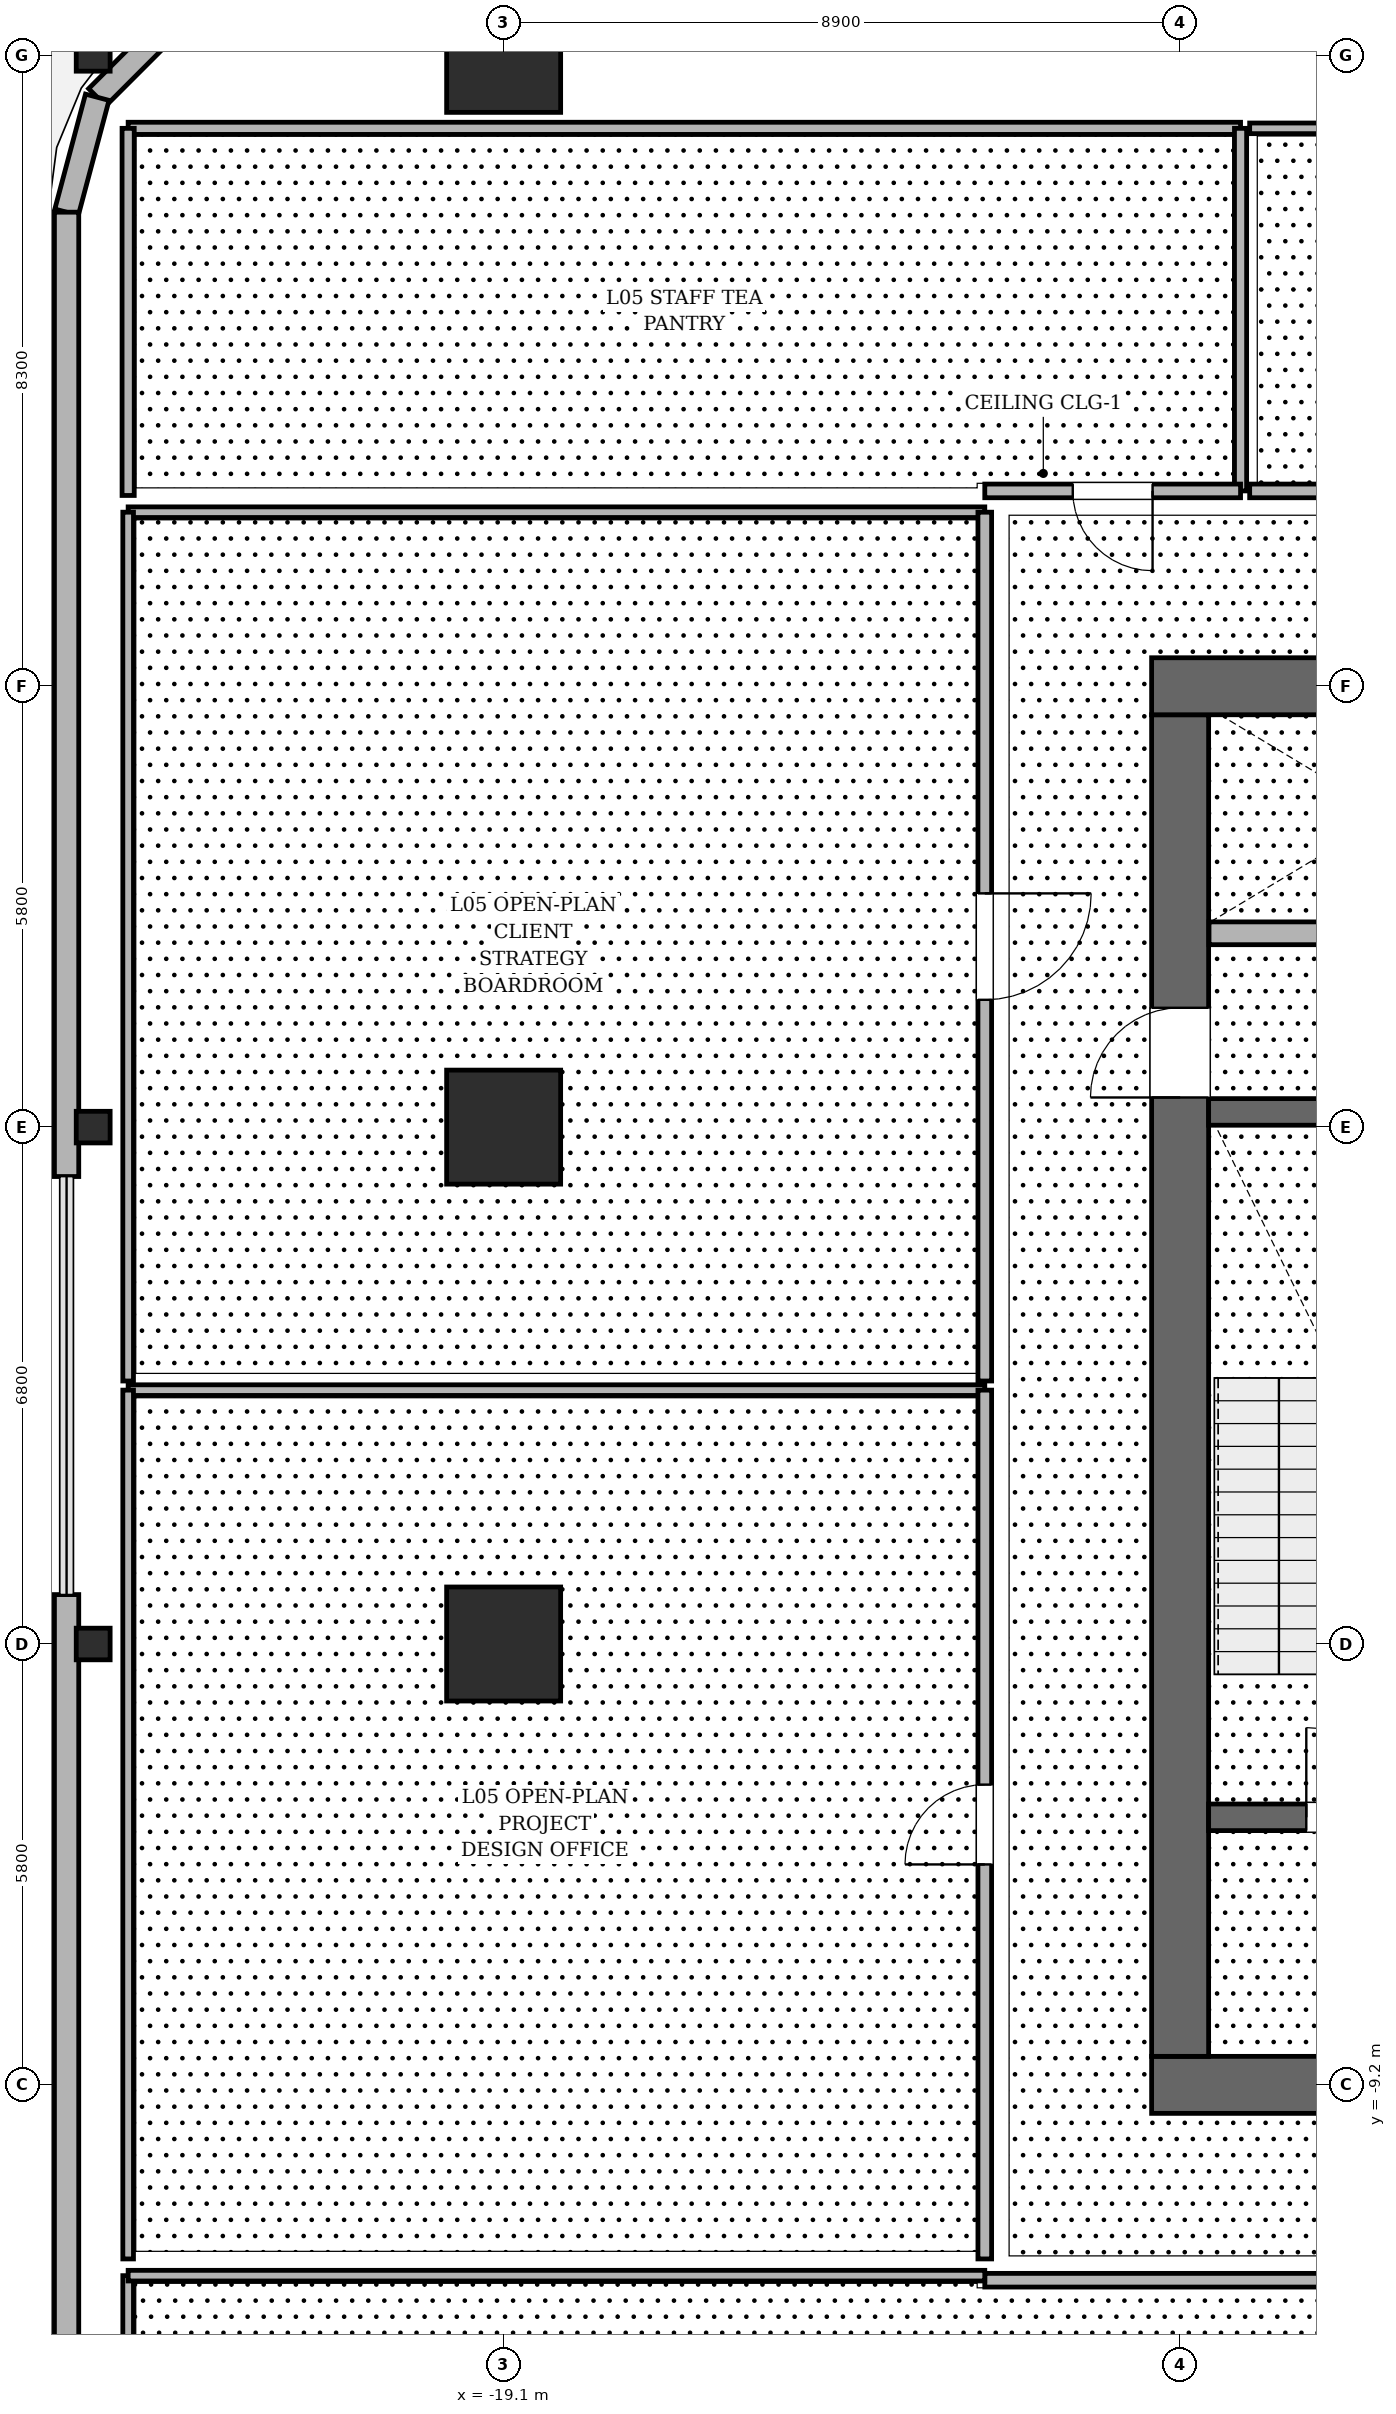
"""IFC4 building model, lengths in metres.
Left out: names, types, materials, properties, quantities, classifications, styles, units other than length and angle.
Written with IfcOpenShell. Run it as: python <this file> out.ifc"""

import sys

from ifc_helpers import new_model, si_unit, direction, frame, frame_2d, origin, origin_2d, place, context, subcontext, project, spatial, rectangle, hollow_rectangle, i_section, extrude, element, fill, save


model = new_model("IFC4")
c1 = context("Model", 3, precision=1e-05, world=origin(), true_north=direction((0.0, 1.0)))
c2 = subcontext(c1, "Body", "Model", "MODEL_VIEW")
j1 = project(units=[si_unit("LENGTHUNIT", "METRE"), si_unit("PLANEANGLEUNIT", "RADIAN")], contexts=[c1])
p1 = place(None, origin())
s1 = spatial("IfcSite", under=j1, at=p1, CompositionType="ELEMENT")
p2 = place(p1, origin())
s2 = spatial("IfcBuilding", under=s1, at=p2, CompositionType="ELEMENT")
p3 = place(p2, frame((0.0, 0.0, 28.2)))
s3 = spatial("IfcBuildingStorey", under=s2, at=p3, CompositionType="ELEMENT", Elevation=28.2)
p4 = place(p3, frame((10.575, -9.2, 0.0), z_axis=(0.0, 0.0, 1.0), x_axis=(-1.0, 0.0, 0.0)))
e1 = element("IfcWall", 1, at=p4, inside=s3, PredefinedType="SHEAR", context=c2, shape_type="SweptSolid", body=[
    extrude(rectangle(XDim=21.15, YDim=0.75, at=frame_2d((10.575, 0.0))), origin(), (0.0, 0.0, 1.0), 4.05),
])
p5 = place(p4, frame((2.85, 0.0, 0.0)))
e2 = element("IfcOpeningElement", 2, at=p5, cuts=e1, PredefinedType="OPENING", context=c2, shape_type="SweptSolid", body=[
    extrude(rectangle(XDim=1.25, YDim=2.25, at=frame_2d((0.625, 1.125))), frame((0.0, 0.385, 0.0), z_axis=(0.0, -1.0, 0.0), x_axis=(1.0, 0.0, 0.0)), (0.0, 0.0, 1.0), 0.77),
])
p6 = place(p4, frame((17.05, 0.0, 0.0)))
e3 = element("IfcOpeningElement", 3, at=p6, cuts=e1, PredefinedType="OPENING", context=c2, shape_type="SweptSolid", body=[
    extrude(rectangle(XDim=1.25, YDim=2.25, at=frame_2d((0.625, 1.125))), frame((0.0, 0.385, 0.0), z_axis=(0.0, -1.0, 0.0), x_axis=(1.0, 0.0, 0.0)), (0.0, 0.0, 1.0), 0.77),
])
p7 = place(p3, frame((-10.2, -8.825, 0.0), z_axis=(0.0, 0.0, 1.0), x_axis=(0.0, 1.0, 0.0)))
e4 = element("IfcWall", 4, at=p7, inside=s3, PredefinedType="SHEAR", context=c2, shape_type="SweptSolid", body=[
    extrude(rectangle(XDim=17.65, YDim=0.75, at=frame_2d((8.825, 0.0))), origin(), (0.0, 0.0, 1.0), 4.05),
])
p8 = place(p7, frame((12.615, 0.0, 0.0)))
e5 = element("IfcOpeningElement", 5, at=p8, cuts=e4, PredefinedType="OPENING", context=c2, shape_type="SweptSolid", body=[
    extrude(rectangle(XDim=1.18, YDim=2.2, at=frame_2d((0.59, 1.1))), frame((0.0, 0.385, 0.0), z_axis=(0.0, -1.0, 0.0), x_axis=(1.0, 0.0, 0.0)), (0.0, 0.0, 1.0), 0.77),
])
p9 = place(p3, frame((-10.575, 9.2, 0.0), z_axis=(0.0, 0.0, 1.0), x_axis=(1.0, 0.0, 0.0)))
e6 = element("IfcWall", 6, at=p9, inside=s3, PredefinedType="SHEAR", context=c2, shape_type="SweptSolid", body=[
    extrude(rectangle(XDim=21.15, YDim=0.75, at=frame_2d((10.575, 0.0))), origin(), (0.0, 0.0, 1.0), 4.05),
])
p10 = place(p3, frame((-9.825, -5.68, 0.0), z_axis=(0.0, 0.0, 1.0), x_axis=(1.0, 0.0, 0.0)))
e7 = element("IfcWall", 7, at=p10, inside=s3, PredefinedType="SOLIDWALL", context=c2, shape_type="SweptSolid", body=[
    extrude(rectangle(XDim=5.175, YDim=0.35, at=frame_2d((2.587, 0.0))), origin(), (0.0, 0.0, 1.0), 4.05),
])
p11 = place(p10, frame((1.285, 0.0, 0.0)))
e8 = element("IfcOpeningElement", 8, at=p11, cuts=e7, PredefinedType="OPENING", context=c2, shape_type="SweptSolid", body=[
    extrude(rectangle(XDim=1.18, YDim=2.2, at=frame_2d((0.59, 1.1))), frame((0.0, 0.185, 0.0), z_axis=(0.0, -1.0, 0.0), x_axis=(1.0, 0.0, 0.0)), (0.0, 0.0, 1.0), 0.37),
])
p12 = place(p3, frame((-9.825, 3.6, 0.0), z_axis=(0.0, 0.0, 1.0), x_axis=(1.0, 0.0, 0.0)))
e9 = element("IfcWall", 9, at=p12, inside=s3, PredefinedType="SOLIDWALL", context=c2, shape_type="SweptSolid", body=[
    extrude(rectangle(XDim=5.175, YDim=0.35, at=frame_2d((2.587, 0.0))), origin(), (0.0, 0.0, 1.0), 4.05),
])
for number, where, z_axis, x_axis in (
    (10, (-19.1, 17.5, 0.0), (0.0, 0.0, 1.0), (1.0, 0.0, 0.0)),
    (11, (-19.1, 3.4, 0.0), (0.0, 0.0, 1.0), (1.0, 0.0, 0.0)),
    (12, (-19.1, -3.4, 0.0), (0.0, 0.0, 1.0), (1.0, 0.0, 0.0)),
):
    element("IfcColumn", number, at=place(p3, frame(where, z_axis=z_axis, x_axis=x_axis)), inside=s3, PredefinedType="COLUMN", context=c2, shape_type="SweptSolid", body=[
        extrude(hollow_rectangle(XDim=1.5, YDim=1.5, WallThickness=0.045, at=origin_2d()), origin(), (0.0, 0.0, 1.0), 4.05),
    ])
for number, where, z_axis, x_axis in (
    (13, (-24.5, -3.4, 0.0), (0.0, 0.0, 1.0), (0.0, 1.0, 0.0)),
    (14, (-24.5, 3.4, 0.0), (0.0, 0.0, 1.0), (0.0, 1.0, 0.0)),
    (15, (-24.5, 17.5, 0.0), (0.0, 0.0, 1.0), (0.0, 1.0, 0.0)),
):
    element("IfcColumn", number, at=place(p3, frame(where, z_axis=z_axis, x_axis=x_axis)), inside=s3, PredefinedType="COLUMN", context=c2, shape_type="SweptSolid", body=[
        extrude(i_section(OverallWidth=0.416, OverallDepth=0.446, WebThickness=0.039, FlangeThickness=0.062, FilletRadius=0.018, at=origin_2d()), origin(), (0.0, 0.0, 1.0), 4.048),
    ])
p13 = place(p3, frame((-23.349, 18.047, 0.0), z_axis=(0.0, 0.0, 1.0), x_axis=(-0.707106781187, -0.707106781187, 0.0)))
e16 = element("IfcWall", 16, at=p13, inside=s3, PredefinedType="SOLIDWALL", context=c2, shape_type="SweptSolid", body=[
    extrude(rectangle(XDim=1.552, YDim=0.32, at=frame_2d((0.776, 0.0))), origin(), (0.0, 0.0, 1.0), 2.484),
])
p14 = place(p3, frame((-24.447, 16.949, 0.0), z_axis=(0.0, 0.0, 1.0), x_axis=(-0.257847112249, -0.966185730957, 0.0)))
e17 = element("IfcWall", 17, at=p14, inside=s3, PredefinedType="SOLIDWALL", context=c2, shape_type="SweptSolid", body=[
    extrude(rectangle(XDim=1.565, YDim=0.32, at=frame_2d((0.783, 0.0))), origin(), (0.0, 0.0, 1.0), 2.524),
])
p15 = place(p3, frame((-24.85, 15.437, 0.0), z_axis=(0.0, 0.0, 1.0), x_axis=(0.0, -1.0, 0.0)))
e18 = element("IfcWall", 18, at=p15, inside=s3, PredefinedType="SOLIDWALL", context=c2, shape_type="SweptSolid", body=[
    extrude(rectangle(XDim=12.687, YDim=0.32, at=frame_2d((6.344, 0.0))), origin(), (0.0, 0.0, 1.0), 2.524),
])
p16 = place(p3, frame((-24.85, -2.75, 0.0), z_axis=(0.0, 0.0, 1.0), x_axis=(0.0, -1.0, 0.0)))
e19 = element("IfcWall", 19, at=p16, inside=s3, PredefinedType="SOLIDWALL", context=c2, shape_type="SweptSolid", body=[
    extrude(rectangle(XDim=17.487, YDim=0.32, at=frame_2d((8.743, 0.0))), origin(), (0.0, 0.0, 1.0), 2.524),
])
p17 = place(p3, frame((-9.82, 5.95, 0.0), z_axis=(0.0, 0.0, 1.0), x_axis=(1.0, 0.0, 0.0)))
e20 = element("IfcWall", 20, at=p17, inside=s3, PredefinedType="SOLIDWALL", context=c2, shape_type="SweptSolid", body=[
    extrude(rectangle(XDim=4.76, YDim=0.3, at=frame_2d((2.38, 0.0))), origin(), (0.0, 0.0, 1.0), 3.81),
])
p18 = place(p3, frame((-12.77, -11.77, 0.0), z_axis=(0.0, 0.0, 1.0), x_axis=(1.0, 0.0, 0.0)))
e21 = element("IfcWall", 21, at=p18, inside=s3, PredefinedType="PARTITIONING", context=c2, shape_type="SweptSolid", body=[
    extrude(rectangle(XDim=25.54, YDim=0.18, at=frame_2d((12.77, 0.0))), origin(), (0.0, 0.0, 1.0), 3.104),
])
p19 = place(p18, frame((12.245, 0.0, 0.0)))
e22 = element("IfcOpeningElement", 22, at=p19, cuts=e21, PredefinedType="OPENING", context=c2, shape_type="SweptSolid", body=[
    extrude(rectangle(XDim=1.05, YDim=2.2, at=frame_2d((0.525, 1.1))), frame((0.0, 0.1, 0.0), z_axis=(0.0, -1.0, 0.0), x_axis=(1.0, 0.0, 0.0)), (0.0, 0.0, 1.0), 0.2),
])
p20 = place(p3, frame((-24.04, -22.147, 0.0), z_axis=(0.0, 0.0, 1.0), x_axis=(0.0, 1.0, 0.0)))
e23 = element("IfcWall", 23, at=p20, inside=s3, PredefinedType="PARTITIONING", context=c2, shape_type="SweptSolid", body=[
    extrude(rectangle(XDim=10.438, YDim=0.14, at=frame_2d((5.219, 0.0))), origin(), (0.0, 0.0, 1.0), 2.484),
])
for number, where, z_axis, x_axis in (
    (24, (-24.04, -11.71, 0.0), (0.0, 0.0, 1.0), (1.0, 0.0, 0.0)),
    (25, (-24.04, -0.06, 0.0), (0.0, 0.0, 1.0), (1.0, 0.0, 0.0)),
):
    element("IfcWall", number, at=place(p3, frame(where, z_axis=z_axis, x_axis=x_axis)), inside=s3, PredefinedType="PARTITIONING", context=c2, shape_type="SweptSolid", body=[
        extrude(rectangle(XDim=11.27, YDim=0.14, at=frame_2d((5.635, 0.0))), origin(), (0.0, 0.0, 1.0), 3.104),
    ])
p21 = place(p3, frame((-12.77, -0.06, 0.0), z_axis=(0.0, 0.0, 1.0), x_axis=(0.0, -1.0, 0.0)))
e26 = element("IfcWall", 26, at=p21, inside=s3, PredefinedType="PARTITIONING", context=c2, shape_type="SweptSolid", body=[
    extrude(rectangle(XDim=11.43, YDim=0.18, at=frame_2d((5.715, 0.0))), origin(), (0.0, 0.0, 1.0), 3.104),
])
p22 = place(p21, frame((5.19, 0.0, 0.0)))
e27 = element("IfcOpeningElement", 27, at=p22, cuts=e26, PredefinedType="OPENING", context=c2, shape_type="SweptSolid", body=[
    extrude(rectangle(XDim=1.05, YDim=2.2, at=frame_2d((0.525, 1.1))), frame((0.0, 0.1, 0.0), z_axis=(0.0, -1.0, 0.0), x_axis=(1.0, 0.0, 0.0)), (0.0, 0.0, 1.0), 0.2),
])
p23 = place(p3, frame((-24.04, -11.49, 0.0), z_axis=(0.0, 0.0, 1.0), x_axis=(0.0, 1.0, 0.0)))
e28 = element("IfcWall", 28, at=p23, inside=s3, PredefinedType="PARTITIONING", context=c2, shape_type="SweptSolid", body=[
    extrude(rectangle(XDim=11.43, YDim=0.14, at=frame_2d((5.715, 0.0))), origin(), (0.0, 0.0, 1.0), 2.484),
])
p24 = place(p3, frame((-24.04, 11.49, 0.0), z_axis=(0.0, 0.0, 1.0), x_axis=(1.0, 0.0, 0.0)))
e29 = element("IfcWall", 29, at=p24, inside=s3, PredefinedType="PARTITIONING", context=c2, shape_type="SweptSolid", body=[
    extrude(rectangle(XDim=11.27, YDim=0.14, at=frame_2d((5.635, 0.0))), origin(), (0.0, 0.0, 1.0), 3.104),
])
p25 = place(p3, frame((-12.77, 11.49, 0.0), z_axis=(0.0, 0.0, 1.0), x_axis=(0.0, -1.0, 0.0)))
e30 = element("IfcWall", 30, at=p25, inside=s3, PredefinedType="PARTITIONING", context=c2, shape_type="SweptSolid", body=[
    extrude(rectangle(XDim=11.43, YDim=0.18, at=frame_2d((5.715, 0.0))), origin(), (0.0, 0.0, 1.0), 3.104),
])
p26 = place(p25, frame((5.015, 0.0, 0.0)))
e31 = element("IfcOpeningElement", 31, at=p26, cuts=e30, PredefinedType="OPENING", context=c2, shape_type="SweptSolid", body=[
    extrude(rectangle(XDim=1.4, YDim=2.25, at=frame_2d((0.7, 1.125))), frame((0.0, 0.1, 0.0), z_axis=(0.0, -1.0, 0.0), x_axis=(1.0, 0.0, 0.0)), (0.0, 0.0, 1.0), 0.2),
])
p27 = place(p3, frame((-24.04, 0.06, 0.0), z_axis=(0.0, 0.0, 1.0), x_axis=(0.0, 1.0, 0.0)))
e32 = element("IfcWall", 32, at=p27, inside=s3, PredefinedType="PARTITIONING", context=c2, shape_type="SweptSolid", body=[
    extrude(rectangle(XDim=11.43, YDim=0.14, at=frame_2d((5.715, 0.0))), origin(), (0.0, 0.0, 1.0), 2.484),
])
p28 = place(p3, frame((-24.04, 16.54, 0.0), z_axis=(0.0, 0.0, 1.0), x_axis=(1.0, 0.0, 0.0)))
e33 = element("IfcWall", 33, at=p28, inside=s3, PredefinedType="PARTITIONING", context=c2, shape_type="SweptSolid", body=[
    extrude(rectangle(XDim=14.635, YDim=0.16, at=frame_2d((7.317, 0.0))), origin(), (0.0, 0.0, 1.0), 3.104),
])
p29 = place(p3, frame((-9.405, 16.54, 0.0), z_axis=(0.0, 0.0, 1.0), x_axis=(0.0, -1.0, 0.0)))
e34 = element("IfcWall", 34, at=p29, inside=s3, PredefinedType="PARTITIONING", context=c2, shape_type="SweptSolid", body=[
    extrude(rectangle(XDim=4.77, YDim=0.16, at=frame_2d((2.385, 0.0))), origin(), (0.0, 0.0, 1.0), 3.81),
])
p30 = place(p3, frame((-9.405, 11.77, 0.0), z_axis=(0.0, 0.0, 1.0), x_axis=(-1.0, 0.0, 0.0)))
e35 = element("IfcWall", 35, at=p30, inside=s3, PredefinedType="PARTITIONING", context=c2, shape_type="SweptSolid", body=[
    extrude(rectangle(XDim=3.365, YDim=0.18, at=frame_2d((1.683, 0.0))), origin(), (0.0, 0.0, 1.0), 3.104),
])
p31 = place(p30, frame((1.157, 0.0, 0.0)))
e36 = element("IfcOpeningElement", 36, at=p31, cuts=e35, PredefinedType="OPENING", context=c2, shape_type="SweptSolid", body=[
    extrude(rectangle(XDim=1.05, YDim=2.2, at=frame_2d((0.525, 1.1))), frame((0.0, 0.1, 0.0), z_axis=(0.0, -1.0, 0.0), x_axis=(1.0, 0.0, 0.0)), (0.0, 0.0, 1.0), 0.2),
])
p32 = place(p3, frame((-24.04, 11.71, 0.0), z_axis=(0.0, 0.0, 1.0), x_axis=(0.0, 1.0, 0.0)))
e37 = element("IfcWall", 37, at=p32, inside=s3, PredefinedType="PARTITIONING", context=c2, shape_type="SweptSolid", body=[
    extrude(rectangle(XDim=4.83, YDim=0.16, at=frame_2d((2.415, 0.0))), origin(), (0.0, 0.0, 1.0), 3.81),
])
p33 = place(p3, frame((8.652, 11.77, 0.0), z_axis=(0.0, 0.0, 1.0), x_axis=(-1.0, 0.0, 0.0)))
e38 = element("IfcWall", 38, at=p33, inside=s3, PredefinedType="PARTITIONING", context=c2, shape_type="SweptSolid", body=[
    extrude(rectangle(XDim=17.937, YDim=0.18, at=frame_2d((8.969, 0.0))), origin(), (0.0, 0.0, 1.0), 3.104),
])
p34 = place(p33, frame((8.444, 0.0, 0.0)))
e39 = element("IfcOpeningElement", 39, at=p34, cuts=e38, PredefinedType="OPENING", context=c2, shape_type="SweptSolid", body=[
    extrude(rectangle(XDim=1.05, YDim=2.2, at=frame_2d((0.525, 1.1))), frame((0.0, 0.1, 0.0), z_axis=(0.0, -1.0, 0.0), x_axis=(1.0, 0.0, 0.0)), (0.0, 0.0, 1.0), 0.2),
])
p35 = place(p3, frame((-9.285, 16.54, 0.0), z_axis=(0.0, 0.0, 1.0), x_axis=(1.0, 0.0, 0.0)))
e40 = element("IfcWall", 40, at=p35, inside=s3, PredefinedType="PARTITIONING", context=c2, shape_type="SweptSolid", body=[
    extrude(rectangle(XDim=17.937, YDim=0.14, at=frame_2d((8.969, 0.0))), origin(), (0.0, 0.0, 1.0), 3.104),
])
p36 = place(p11, origin())
e41 = element("IfcDoor", 41, at=p36, inside=s3, OperationType="SINGLE_SWING_LEFT", PredefinedType="DOOR", context=c2, shape_type="SweptSolid", body=[
    extrude(rectangle(XDim=1.18, YDim=2.2, at=frame_2d((0.59, 1.1))), frame((0.0, 0.025, 0.0), z_axis=(0.0, -1.0, 0.0), x_axis=(1.0, 0.0, 0.0)), (0.0, 0.0, 1.0), 0.05),
])
fill(e8, e41)
p37 = place(p8, origin())
e42 = element("IfcDoor", 42, at=p37, inside=s3, OperationType="SINGLE_SWING_LEFT", PredefinedType="DOOR", context=c2, shape_type="SweptSolid", body=[
    extrude(rectangle(XDim=1.18, YDim=2.2, at=frame_2d((0.59, 1.1))), frame((0.0, 0.025, 0.0), z_axis=(0.0, -1.0, 0.0), x_axis=(1.0, 0.0, 0.0)), (0.0, 0.0, 1.0), 0.05),
])
fill(e5, e42)
p38 = place(p22, origin())
e43 = element("IfcDoor", 43, at=p38, inside=s3, OperationType="SINGLE_SWING_RIGHT", PredefinedType="DOOR", context=c2, shape_type="SweptSolid", body=[
    extrude(rectangle(XDim=1.05, YDim=2.2, at=frame_2d((0.525, 1.1))), frame((0.0, 0.025, 0.0), z_axis=(0.0, -1.0, 0.0), x_axis=(1.0, 0.0, 0.0)), (0.0, 0.0, 1.0), 0.05),
])
fill(e27, e43)
p39 = place(p26, origin())
e44 = element("IfcDoor", 44, at=p39, inside=s3, OperationType="SINGLE_SWING_LEFT", PredefinedType="DOOR", context=c2, shape_type="SweptSolid", body=[
    extrude(rectangle(XDim=1.4, YDim=2.25, at=frame_2d((0.7, 1.125))), frame((0.0, 0.025, 0.0), z_axis=(0.0, -1.0, 0.0), x_axis=(1.0, 0.0, 0.0)), (0.0, 0.0, 1.0), 0.05),
])
fill(e31, e44)
p40 = place(p31, origin())
e45 = element("IfcDoor", 45, at=p40, inside=s3, OperationType="SINGLE_SWING_LEFT", PredefinedType="DOOR", context=c2, shape_type="SweptSolid", body=[
    extrude(rectangle(XDim=1.05, YDim=2.2, at=frame_2d((0.525, 1.1))), frame((0.0, 0.025, 0.0), z_axis=(0.0, -1.0, 0.0), x_axis=(1.0, 0.0, 0.0)), (0.0, 0.0, 1.0), 0.05),
])
fill(e36, e45)
save(model, sys.argv[1])
